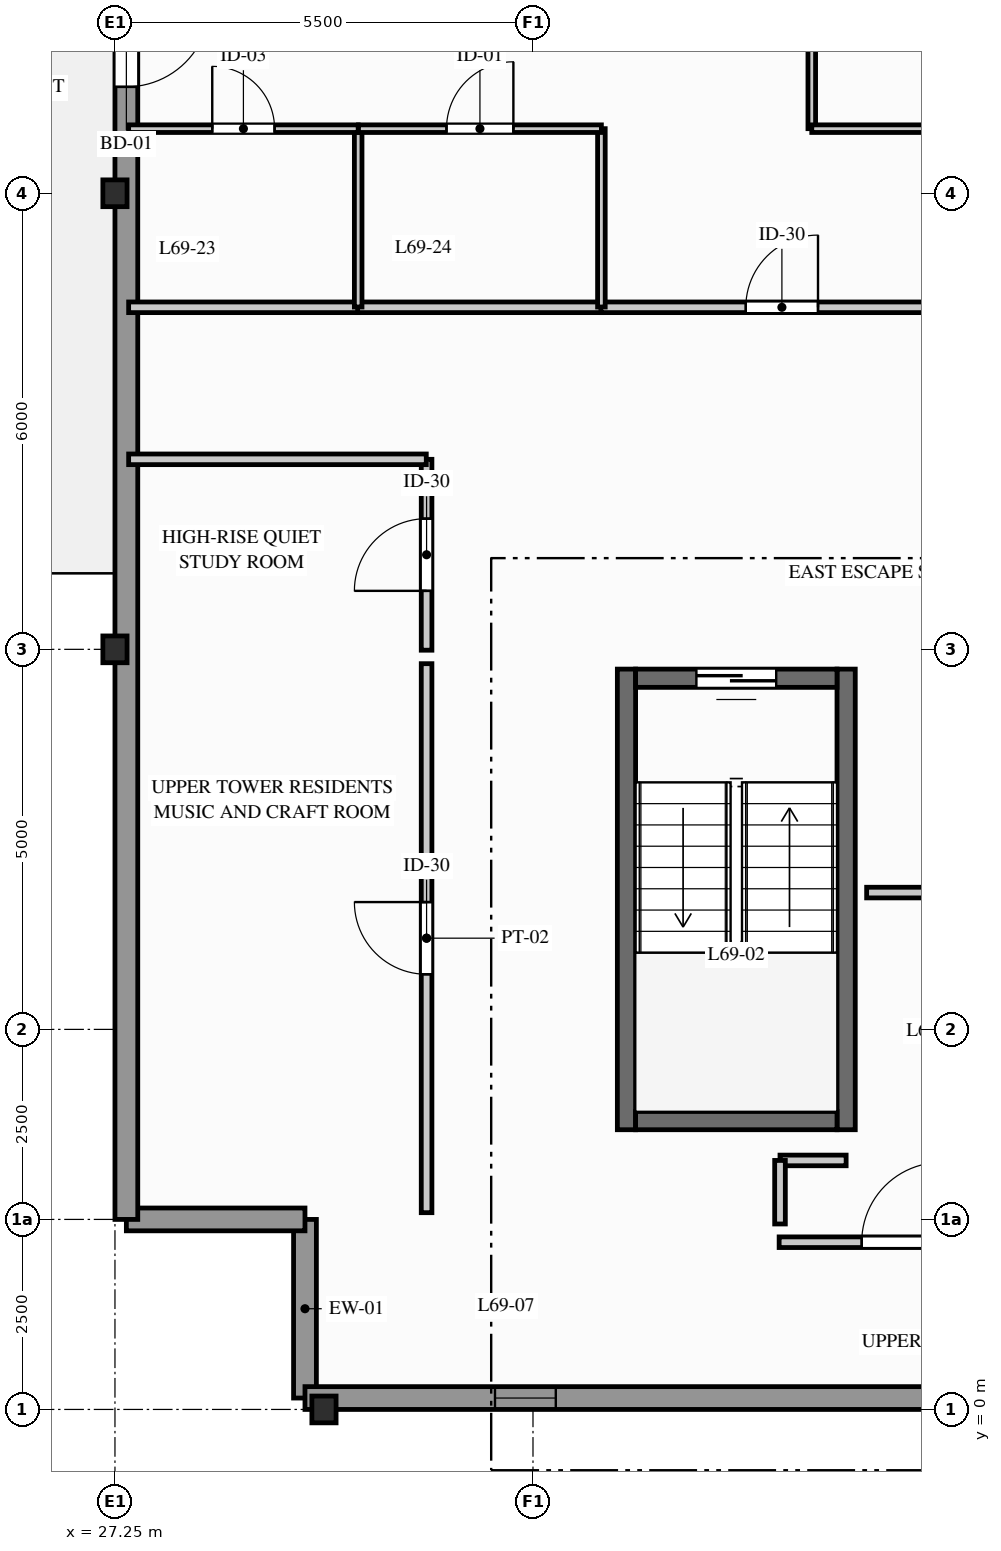
"""IFC4 building model, lengths in metres.
Left out: names, types, materials, properties, quantities, classifications, styles, units other than length and angle.
Written with IfcOpenShell. Run it as: python <this file> out.ifc"""

import sys

from ifc_helpers import new_model, si_unit, direction, frame, frame_2d, origin, origin_2d, place, context, subcontext, project, spatial, rectangle, i_section, extrude, element, fill, save


model = new_model("IFC4")
c1 = context("Model", 3, precision=1e-05, world=origin(), true_north=direction((0.0, 1.0)))
c2 = subcontext(c1, "Body", "Model", "MODEL_VIEW")
j1 = project(units=[si_unit("LENGTHUNIT", "METRE"), si_unit("PLANEANGLEUNIT", "RADIAN")], contexts=[c1])
p1 = place(None, origin())
s1 = spatial("IfcSite", under=j1, at=p1, CompositionType="ELEMENT")
p2 = place(p1, origin())
s2 = spatial("IfcBuilding", under=s1, at=p2, CompositionType="ELEMENT")
p3 = place(p2, frame((0.0, 0.0, 227.3)))
s3 = spatial("IfcBuildingStorey", under=s2, at=p3, CompositionType="ELEMENT", Elevation=227.3)
for number, where, z_axis, x_axis in (
    (1, (27.25, 10.0, 0.0), (0.0, 0.0, 1.0), (1.0, 0.0, 0.0)),
    (2, (27.25, 16.0, 0.0), (0.0, 0.0, 1.0), (1.0, 0.0, 0.0)),
    (3, (30.0, 0.0, 0.0), (0.0, 0.0, 1.0), (1.0, 0.0, 0.0)),
):
    element("IfcColumn", number, at=place(p3, frame(where, z_axis=z_axis, x_axis=x_axis)), inside=s3, PredefinedType="COLUMN", context=c2, shape_type="SweptSolid", body=[
        extrude(i_section(OverallWidth=0.318, OverallDepth=0.353, WebThickness=0.023, FlangeThickness=0.038, FilletRadius=0.015, at=origin_2d()), origin(), (0.0, 0.0, 1.0), 3.1),
    ])
for number, where, z_axis, x_axis in (
    (4, (29.75, 2.5, 0.0), (0.0, 0.0, 1.0), (0.0, -1.0, 0.0)),
    (5, (27.4, 2.5, 0.0), (0.0, 0.0, 1.0), (1.0, 0.0, 0.0)),
):
    element("IfcWall", number, at=place(p3, frame(where, z_axis=z_axis, x_axis=x_axis)), inside=s3, PredefinedType="STANDARD", context=c2, shape_type="SweptSolid", body=[
        extrude(rectangle(XDim=2.35, YDim=0.3, at=frame_2d((1.175, 0.0))), origin(), (0.0, 0.0, 1.0), 2.89),
    ])
p4 = place(p3, frame((29.75, 0.15, 0.0), z_axis=(0.0, 0.0, 1.0), x_axis=(1.0, 0.0, 0.0)))
e6 = element("IfcWall", 6, at=p4, inside=s3, PredefinedType="STANDARD", context=c2, shape_type="SweptSolid", body=[
    extrude(rectangle(XDim=27.75, YDim=0.3, at=frame_2d((13.875, 0.0))), origin(), (0.0, 0.0, 1.0), 2.332),
])
p5 = place(p4, frame((2.5, 0.0, 0.712)))
e7 = element("IfcOpeningElement", 7, at=p5, cuts=e6, PredefinedType="OPENING", context=c2, shape_type="SweptSolid", body=[
    extrude(rectangle(XDim=0.8, YDim=1.4, at=frame_2d((0.4, 0.7))), frame((0.0, 0.16, 0.0), z_axis=(0.0, -1.0, 0.0), x_axis=(1.0, 0.0, 0.0)), (0.0, 0.0, 1.0), 0.32),
])
p6 = place(p4, frame((21.25, 0.0, 0.312)))
e8 = element("IfcOpeningElement", 8, at=p6, cuts=e6, PredefinedType="OPENING", context=c2, shape_type="SweptSolid", body=[
    extrude(rectangle(XDim=1.5, YDim=1.8, at=frame_2d((0.75, 0.9))), frame((0.0, 0.16, 0.0), z_axis=(0.0, -1.0, 0.0), x_axis=(1.0, 0.0, 0.0)), (0.0, 0.0, 1.0), 0.32),
])
p7 = place(p3, frame((27.4, 24.0, 0.0), z_axis=(0.0, 0.0, 1.0), x_axis=(0.0, -1.0, 0.0)))
e9 = element("IfcWall", 9, at=p7, inside=s3, PredefinedType="STANDARD", context=c2, shape_type="SweptSolid", body=[
    extrude(rectangle(XDim=21.5, YDim=0.3, at=frame_2d((10.75, 0.0))), origin(), (0.0, 0.0, 1.0), 2.332),
])
p8 = place(p7, frame((5.5, 0.0, 0.0)))
e10 = element("IfcOpeningElement", 10, at=p8, cuts=e9, PredefinedType="OPENING", context=c2, shape_type="SweptSolid", body=[
    extrude(rectangle(XDim=1.1, YDim=2.2, at=frame_2d((0.55, 1.1))), frame((0.0, 0.16, 0.0), z_axis=(0.0, -1.0, 0.0), x_axis=(1.0, 0.0, 0.0)), (0.0, 0.0, 1.0), 0.32),
])
p9 = place(p7, frame((2.43, 0.0, 0.312)))
e11 = element("IfcOpeningElement", 11, at=p9, cuts=e9, PredefinedType="OPENING", context=c2, shape_type="SweptSolid", body=[
    extrude(rectangle(XDim=1.5, YDim=1.8, at=frame_2d((0.75, 0.9))), frame((0.0, 0.16, 0.0), z_axis=(0.0, -1.0, 0.0), x_axis=(1.0, 0.0, 0.0)), (0.0, 0.0, 1.0), 0.32),
])
for number, where, z_axis, x_axis in (
    (12, (33.98, 3.68, 0.0), (0.0, 0.0, 1.0), (0.0, 1.0, 0.0)),
    (13, (36.87, 3.68, 0.0), (0.0, 0.0, 1.0), (0.0, 1.0, 0.0)),
):
    element("IfcWall", number, at=place(p3, frame(where, z_axis=z_axis, x_axis=x_axis)), inside=s3, PredefinedType="SHEAR", context=c2, shape_type="SweptSolid", body=[
        extrude(rectangle(XDim=6.06, YDim=0.24, at=frame_2d((3.03, 0.0))), origin(), (0.0, 0.0, 1.0), 2.89),
    ])
p10 = place(p3, frame((34.1, 3.8, 0.0), z_axis=(0.0, 0.0, 1.0), x_axis=(1.0, 0.0, 0.0)))
e14 = element("IfcWall", 14, at=p10, inside=s3, PredefinedType="SHEAR", context=c2, shape_type="SweptSolid", body=[
    extrude(rectangle(XDim=2.65, YDim=0.24, at=frame_2d((1.325, 0.0))), origin(), (0.0, 0.0, 1.0), 2.89),
])
p11 = place(p3, frame((36.75, 9.62, 0.0), z_axis=(0.0, 0.0, 1.0), x_axis=(-1.0, 0.0, 0.0)))
e15 = element("IfcWall", 15, at=p11, inside=s3, PredefinedType="SHEAR", context=c2, shape_type="SweptSolid", body=[
    extrude(rectangle(XDim=2.65, YDim=0.24, at=frame_2d((1.325, 0.0))), origin(), (0.0, 0.0, 1.0), 2.89),
])
p12 = place(p11, frame((0.8, 0.0, 0.0)))
e16 = element("IfcOpeningElement", 16, at=p12, cuts=e15, PredefinedType="OPENING", context=c2, shape_type="SweptSolid", body=[
    extrude(rectangle(XDim=1.05, YDim=2.06, at=frame_2d((0.525, 1.03))), frame((0.0, 0.13, 0.0), z_axis=(0.0, -1.0, 0.0), x_axis=(1.0, 0.0, 0.0)), (0.0, 0.0, 1.0), 0.26),
])
p13 = place(p3, frame((31.35, 2.589, 0.0), z_axis=(0.0, 0.0, 1.0), x_axis=(0.0, 1.0, 0.0)))
e17 = element("IfcWall", 17, at=p13, inside=s3, PredefinedType="PARTITIONING", context=c2, shape_type="SweptSolid", body=[
    extrude(rectangle(XDim=7.223, YDim=0.14, at=frame_2d((3.611, 0.0))), origin(), (0.0, 0.0, 1.0), 2.89),
])
p14 = place(p13, frame((3.136, 0.0, 0.0)))
e18 = element("IfcOpeningElement", 18, at=p14, cuts=e17, PredefinedType="OPENING", context=c2, shape_type="SweptSolid", body=[
    extrude(rectangle(XDim=0.95, YDim=2.05, at=frame_2d((0.475, 1.025))), frame((0.0, 0.08, 0.0), z_axis=(0.0, -1.0, 0.0), x_axis=(1.0, 0.0, 0.0)), (0.0, 0.0, 1.0), 0.16),
])
p15 = place(p3, frame((31.35, 9.989, 0.0), z_axis=(0.0, 0.0, 1.0), x_axis=(0.0, 1.0, 0.0)))
e19 = element("IfcWall", 19, at=p15, inside=s3, PredefinedType="PARTITIONING", context=c2, shape_type="SweptSolid", body=[
    extrude(rectangle(XDim=2.511, YDim=0.14, at=frame_2d((1.256, 0.0))), origin(), (0.0, 0.0, 1.0), 2.325),
])
p16 = place(p15, frame((0.781, 0.0, 0.0)))
e20 = element("IfcOpeningElement", 20, at=p16, cuts=e19, PredefinedType="OPENING", context=c2, shape_type="SweptSolid", body=[
    extrude(rectangle(XDim=0.95, YDim=2.05, at=frame_2d((0.475, 1.025))), frame((0.0, 0.08, 0.0), z_axis=(0.0, -1.0, 0.0), x_axis=(1.0, 0.0, 0.0)), (0.0, 0.0, 1.0), 0.16),
])
p17 = place(p3, frame((35.989, 2.2, 0.0), z_axis=(0.0, 0.0, 1.0), x_axis=(1.0, 0.0, 0.0)))
e21 = element("IfcWall", 21, at=p17, inside=s3, PredefinedType="PARTITIONING", context=c2, shape_type="SweptSolid", body=[
    extrude(rectangle(XDim=3.222, YDim=0.14, at=frame_2d((1.611, 0.0))), origin(), (0.0, 0.0, 1.0), 2.325),
])
p18 = place(p17, frame((1.086, 0.0, 0.0)))
e22 = element("IfcOpeningElement", 22, at=p18, cuts=e21, PredefinedType="OPENING", context=c2, shape_type="SweptSolid", body=[
    extrude(rectangle(XDim=1.05, YDim=2.06, at=frame_2d((0.525, 1.03))), frame((0.0, 0.08, 0.0), z_axis=(0.0, -1.0, 0.0), x_axis=(1.0, 0.0, 0.0)), (0.0, 0.0, 1.0), 0.16),
])
p19 = place(p3, frame((27.43, 12.5, 0.0), z_axis=(0.0, 0.0, 1.0), x_axis=(1.0, 0.0, 0.0)))
e23 = element("IfcWall", 23, at=p19, inside=s3, PredefinedType="PARTITIONING", context=c2, shape_type="SweptSolid", body=[
    extrude(rectangle(XDim=3.916, YDim=0.14, at=frame_2d((1.958, 0.0))), origin(), (0.0, 0.0, 1.0), 2.89),
])
p20 = place(p3, frame((27.43, 14.5, 0.0), z_axis=(0.0, 0.0, 1.0), x_axis=(1.0, 0.0, 0.0)))
e24 = element("IfcWall", 24, at=p20, inside=s3, PredefinedType="PARTITIONING", context=c2, shape_type="SweptSolid", body=[
    extrude(rectangle(XDim=3.031, YDim=0.14, at=frame_2d((1.516, 0.0))), origin(), (0.0, 0.0, 1.0), 2.89),
])
p21 = place(p3, frame((30.443, 14.5, 0.0), z_axis=(0.0, 0.0, 1.0), x_axis=(1.0, 0.0, 0.0)))
e25 = element("IfcWall", 25, at=p21, inside=s3, PredefinedType="PARTITIONING", context=c2, shape_type="SweptSolid", body=[
    extrude(rectangle(XDim=3.219, YDim=0.14, at=frame_2d((1.609, 0.0))), origin(), (0.0, 0.0, 1.0), 2.89),
])
p22 = place(p3, frame((33.643, 14.5, 0.0), z_axis=(0.0, 0.0, 1.0), x_axis=(1.0, 0.0, 0.0)))
e26 = element("IfcWall", 26, at=p22, inside=s3, PredefinedType="PARTITIONING", context=c2, shape_type="SweptSolid", body=[
    extrude(rectangle(XDim=4.765, YDim=0.14, at=frame_2d((2.382, 0.0))), origin(), (0.0, 0.0, 1.0), 2.325),
])
p23 = place(p22, frame((1.907, 0.0, 0.0)))
e27 = element("IfcOpeningElement", 27, at=p23, cuts=e26, PredefinedType="OPENING", context=c2, shape_type="SweptSolid", body=[
    extrude(rectangle(XDim=0.95, YDim=2.05, at=frame_2d((0.475, 1.025))), frame((0.0, 0.08, 0.0), z_axis=(0.0, -1.0, 0.0), x_axis=(1.0, 0.0, 0.0)), (0.0, 0.0, 1.0), 0.16),
])
p24 = place(p3, frame((30.45, 14.504, 0.0), z_axis=(0.0, 0.0, 1.0), x_axis=(0.0, 1.0, 0.0)))
e28 = element("IfcWall", 28, at=p24, inside=s3, PredefinedType="PARTITIONING", context=c2, shape_type="SweptSolid", body=[
    extrude(rectangle(XDim=2.346, YDim=0.1, at=frame_2d((1.173, 0.0))), origin(), (0.0, 0.0, 1.0), 2.325),
])
p25 = place(p3, frame((27.43, 16.85, 0.0), z_axis=(0.0, 0.0, 1.0), x_axis=(1.0, 0.0, 0.0)))
e29 = element("IfcWall", 29, at=p25, inside=s3, PredefinedType="PARTITIONING", context=c2, shape_type="SweptSolid", body=[
    extrude(rectangle(XDim=3.02, YDim=0.1, at=frame_2d((1.51, 0.0))), origin(), (0.0, 0.0, 1.0), 2.89),
])
p26 = place(p25, frame((1.1, 0.0, 0.0)))
e30 = element("IfcOpeningElement", 30, at=p26, cuts=e29, PredefinedType="OPENING", context=c2, shape_type="SweptSolid", body=[
    extrude(rectangle(XDim=0.82, YDim=2.02, at=frame_2d((0.41, 1.01))), frame((0.0, 0.06, 0.0), z_axis=(0.0, -1.0, 0.0), x_axis=(1.0, 0.0, 0.0)), (0.0, 0.0, 1.0), 0.12),
])
p27 = place(p3, frame((33.65, 14.504, 0.0), z_axis=(0.0, 0.0, 1.0), x_axis=(0.0, 1.0, 0.0)))
e31 = element("IfcWall", 31, at=p27, inside=s3, PredefinedType="PARTITIONING", context=c2, shape_type="SweptSolid", body=[
    extrude(rectangle(XDim=2.346, YDim=0.1, at=frame_2d((1.173, 0.0))), origin(), (0.0, 0.0, 1.0), 2.325),
])
p28 = place(p3, frame((30.454, 16.85, 0.0), z_axis=(0.0, 0.0, 1.0), x_axis=(1.0, 0.0, 0.0)))
e32 = element("IfcWall", 32, at=p28, inside=s3, PredefinedType="PARTITIONING", context=c2, shape_type="SweptSolid", body=[
    extrude(rectangle(XDim=3.196, YDim=0.1, at=frame_2d((1.598, 0.0))), origin(), (0.0, 0.0, 1.0), 2.89),
])
p29 = place(p28, frame((1.158, 0.0, 0.0)))
e33 = element("IfcOpeningElement", 33, at=p29, cuts=e32, PredefinedType="OPENING", context=c2, shape_type="SweptSolid", body=[
    extrude(rectangle(XDim=0.88, YDim=2.04, at=frame_2d((0.44, 1.02))), frame((0.0, 0.06, 0.0), z_axis=(0.0, -1.0, 0.0), x_axis=(1.0, 0.0, 0.0)), (0.0, 0.0, 1.0), 0.12),
])
p30 = place(p3, frame((36.418, 16.85, 0.0), z_axis=(0.0, 0.0, 1.0), x_axis=(0.0, 1.0, 0.0)))
e34 = element("IfcWall", 34, at=p30, inside=s3, PredefinedType="PARTITIONING", context=c2, shape_type="SweptSolid", body=[
    extrude(rectangle(XDim=4.896, YDim=0.1, at=frame_2d((2.448, 0.0))), origin(), (0.0, 0.0, 1.0), 2.614),
])
p31 = place(p30, frame((2.008, 0.0, 0.0)))
e35 = element("IfcOpeningElement", 35, at=p31, cuts=e34, PredefinedType="OPENING", context=c2, shape_type="SweptSolid", body=[
    extrude(rectangle(XDim=0.88, YDim=2.04, at=frame_2d((0.44, 1.02))), frame((0.0, 0.06, 0.0), z_axis=(0.0, -1.0, 0.0), x_axis=(1.0, 0.0, 0.0)), (0.0, 0.0, 1.0), 0.12),
])
p32 = place(p3, frame((36.418, 16.85, 0.0), z_axis=(0.0, 0.0, 1.0), x_axis=(1.0, 0.0, 0.0)))
e36 = element("IfcWall", 36, at=p32, inside=s3, PredefinedType="PARTITIONING", context=c2, shape_type="SweptSolid", body=[
    extrude(rectangle(XDim=1.978, YDim=0.1, at=frame_2d((0.989, 0.0))), origin(), (0.0, 0.0, 1.0), 2.325),
])
p33 = place(p3, frame((37.14, 6.8, 0.0), z_axis=(0.0, 0.0, 1.0), x_axis=(1.0, 0.0, 0.0)))
e37 = element("IfcWall", 37, at=p33, inside=s3, PredefinedType="PARTITIONING", context=c2, shape_type="SweptSolid", body=[
    extrude(rectangle(XDim=2.06, YDim=0.14, at=frame_2d((1.03, 0.0))), origin(), (0.0, 0.0, 1.0), 2.325),
])
p34 = place(p3, frame((36.0, 3.276, 0.0), z_axis=(0.0, 0.0, 1.0), x_axis=(1.0, 0.0, 0.0)))
e38 = element("IfcWall", 38, at=p34, inside=s3, PredefinedType="PARTITIONING", context=c2, shape_type="SweptSolid", body=[
    extrude(rectangle(XDim=0.87, YDim=0.14, at=frame_2d((0.435, 0.0))), origin(), (0.0, 0.0, 1.0), 2.89),
])
p35 = place(p3, frame((36.0, 2.44, 0.0), z_axis=(0.0, 0.0, 1.0), x_axis=(0.0, 1.0, 0.0)))
e39 = element("IfcWall", 39, at=p35, inside=s3, PredefinedType="PARTITIONING", context=c2, shape_type="SweptSolid", body=[
    extrude(rectangle(XDim=0.836, YDim=0.14, at=frame_2d((0.418, 0.0))), origin(), (0.0, 0.0, 1.0), 2.89),
])
p36 = place(p5, origin())
e40 = element("IfcWindow", 40, at=p36, inside=s3, PartitioningType="SINGLE_PANEL", PredefinedType="WINDOW", context=c2, shape_type="SweptSolid", body=[
    extrude(rectangle(XDim=0.8, YDim=1.4, at=frame_2d((0.4, 0.7))), frame((0.0, 0.03, 0.0), z_axis=(0.0, -1.0, 0.0), x_axis=(1.0, 0.0, 0.0)), (0.0, 0.0, 1.0), 0.06),
])
fill(e7, e40)
p37 = place(p8, origin())
e41 = element("IfcDoor", 41, at=p37, inside=s3, OperationType="SINGLE_SWING_LEFT", PredefinedType="DOOR", context=c2, shape_type="SweptSolid", body=[
    extrude(rectangle(XDim=1.1, YDim=2.2, at=frame_2d((0.55, 1.1))), frame((0.0, 0.025, 0.0), z_axis=(0.0, -1.0, 0.0), x_axis=(1.0, 0.0, 0.0)), (0.0, 0.0, 1.0), 0.05),
])
fill(e10, e41)
p38 = place(p12, origin())
e42 = element("IfcDoor", 42, at=p38, inside=s3, OperationType="SINGLE_SWING_RIGHT", PredefinedType="DOOR", context=c2, shape_type="SweptSolid", body=[
    extrude(rectangle(XDim=1.05, YDim=2.06, at=frame_2d((0.525, 1.03))), frame((0.0, 0.025, 0.0), z_axis=(0.0, -1.0, 0.0), x_axis=(1.0, 0.0, 0.0)), (0.0, 0.0, 1.0), 0.05),
])
fill(e16, e42)
p39 = place(p14, origin())
e43 = element("IfcDoor", 43, at=p39, inside=s3, OperationType="SINGLE_SWING_RIGHT", PredefinedType="DOOR", context=c2, shape_type="SweptSolid", body=[
    extrude(rectangle(XDim=0.95, YDim=2.05, at=frame_2d((0.475, 1.025))), frame((0.0, 0.025, 0.0), z_axis=(0.0, -1.0, 0.0), x_axis=(1.0, 0.0, 0.0)), (0.0, 0.0, 1.0), 0.05),
])
fill(e18, e43)
p40 = place(p16, origin())
e44 = element("IfcDoor", 44, at=p40, inside=s3, OperationType="SINGLE_SWING_LEFT", PredefinedType="DOOR", context=c2, shape_type="SweptSolid", body=[
    extrude(rectangle(XDim=0.95, YDim=2.05, at=frame_2d((0.475, 1.025))), frame((0.0, 0.025, 0.0), z_axis=(0.0, -1.0, 0.0), x_axis=(1.0, 0.0, 0.0)), (0.0, 0.0, 1.0), 0.05),
])
fill(e20, e44)
p41 = place(p18, origin())
e45 = element("IfcDoor", 45, at=p41, inside=s3, OperationType="SINGLE_SWING_RIGHT", PredefinedType="DOOR", context=c2, shape_type="SweptSolid", body=[
    extrude(rectangle(XDim=1.05, YDim=2.06, at=frame_2d((0.525, 1.03))), frame((0.0, 0.025, 0.0), z_axis=(0.0, -1.0, 0.0), x_axis=(1.0, 0.0, 0.0)), (0.0, 0.0, 1.0), 0.05),
])
fill(e22, e45)
p42 = place(p23, origin())
e46 = element("IfcDoor", 46, at=p42, inside=s3, OperationType="SINGLE_SWING_RIGHT", PredefinedType="DOOR", context=c2, shape_type="SweptSolid", body=[
    extrude(rectangle(XDim=0.95, YDim=2.05, at=frame_2d((0.475, 1.025))), frame((0.0, 0.025, 0.0), z_axis=(0.0, -1.0, 0.0), x_axis=(1.0, 0.0, 0.0)), (0.0, 0.0, 1.0), 0.05),
])
fill(e27, e46)
p43 = place(p26, origin())
e47 = element("IfcDoor", 47, at=p43, inside=s3, OperationType="SINGLE_SWING_LEFT", PredefinedType="DOOR", context=c2, shape_type="SweptSolid", body=[
    extrude(rectangle(XDim=0.82, YDim=2.02, at=frame_2d((0.41, 1.01))), frame((0.0, 0.025, 0.0), z_axis=(0.0, -1.0, 0.0), x_axis=(1.0, 0.0, 0.0)), (0.0, 0.0, 1.0), 0.05),
])
fill(e30, e47)
p44 = place(p29, origin())
e48 = element("IfcDoor", 48, at=p44, inside=s3, OperationType="SINGLE_SWING_RIGHT", PredefinedType="DOOR", context=c2, shape_type="SweptSolid", body=[
    extrude(rectangle(XDim=0.88, YDim=2.04, at=frame_2d((0.44, 1.02))), frame((0.0, 0.025, 0.0), z_axis=(0.0, -1.0, 0.0), x_axis=(1.0, 0.0, 0.0)), (0.0, 0.0, 1.0), 0.05),
])
fill(e33, e48)
save(model, sys.argv[1])
